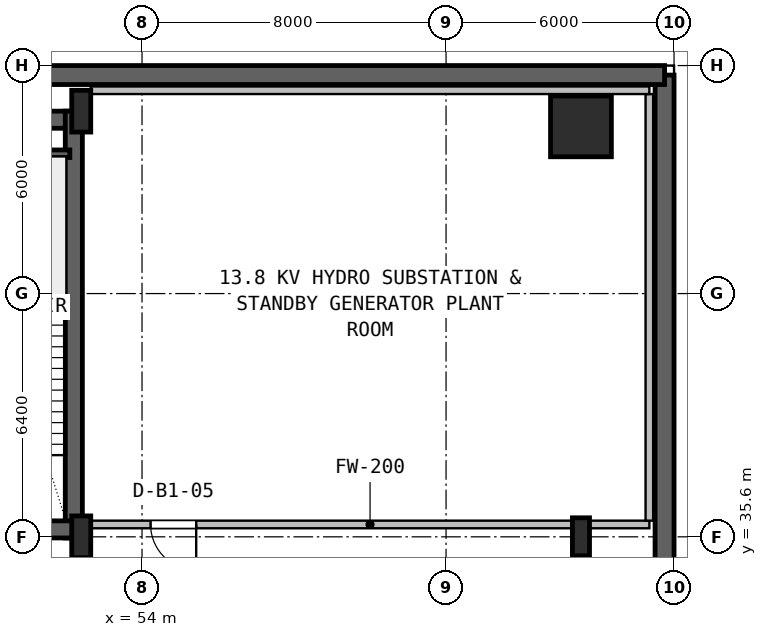
"""IFC4 building model, lengths in metres.
Left out: names, types, materials, properties, quantities, classifications, styles, units other than length and angle.
Written with IfcOpenShell. Run it as: python <this file> out.ifc"""

import sys

from ifc_helpers import new_model, si_unit, direction, frame, frame_2d, origin, origin_2d, place, context, subcontext, project, spatial, rectangle, hollow_rectangle, i_section, extrude, source, transform, mapped, element, fill, save


model = new_model("IFC4")
c1 = context("Model", 3, precision=1e-05, world=origin(), true_north=direction((0.0, 1.0)))
c2 = subcontext(c1, "Body", "Model", "MODEL_VIEW")
j1 = project(units=[si_unit("LENGTHUNIT", "METRE"), si_unit("PLANEANGLEUNIT", "RADIAN")], contexts=[c1])
p1 = place(None, origin())
s1 = spatial("IfcSite", under=j1, at=p1, CompositionType="ELEMENT")
p2 = place(p1, origin())
s2 = spatial("IfcBuilding", under=s1, at=p2, CompositionType="ELEMENT")
p3 = place(p2, frame((0.0, 0.0, -4.8)))
s3 = spatial("IfcBuildingStorey", under=s2, at=p3, CompositionType="ELEMENT", Elevation=-4.8)
p4 = place(p3, frame((67.75, 0.25, 0.0), z_axis=(0.0, 0.0, 1.0), x_axis=(0.0, 1.0, 0.0)))
e1 = element("IfcWall", 1, at=p4, inside=s3, PredefinedType="USERDEFINED", context=c2, shape_type="SweptSolid", body=[
    extrude(rectangle(XDim=47.5, YDim=0.5, at=frame_2d((23.75, 0.0))), origin(), (0.0, 0.0, 1.0), 4.48),
])
p5 = place(p3, frame((67.75, 47.75, 0.0), z_axis=(0.0, 0.0, 1.0), x_axis=(-1.0, 0.0, 0.0)))
e2 = element("IfcWall", 2, at=p5, inside=s3, PredefinedType="USERDEFINED", context=c2, shape_type="SweptSolid", body=[
    extrude(rectangle(XDim=67.5, YDim=0.5, at=frame_2d((33.75, 0.0))), origin(), (0.0, 0.0, 1.0), 4.48),
])
p6 = place(p3, frame((15.6, 46.575, 0.0), z_axis=(0.0, 0.0, 1.0), x_axis=(1.0, 0.0, 0.0)))
e3 = element("IfcWall", 3, at=p6, inside=s3, PredefinedType="SHEAR", context=c2, shape_type="SweptSolid", body=[
    extrude(rectangle(XDim=36.8, YDim=0.45, at=frame_2d((18.4, 0.0))), origin(), (0.0, 0.0, 1.0), 4.48),
])
p7 = place(p3, frame((52.205, 35.57, 0.0), z_axis=(0.0, 0.0, 1.0), x_axis=(0.0, 1.0, 0.0)))
e4 = element("IfcWall", 4, at=p7, inside=s3, PredefinedType="SHEAR", context=c2, shape_type="SweptSolid", body=[
    extrude(rectangle(XDim=11.23, YDim=0.45, at=frame_2d((5.615, 0.0))), origin(), (0.0, 0.0, 1.0), 4.48),
])
p8 = place(p3, frame((43.2, 35.795, 0.0), z_axis=(0.0, 0.0, 1.0), x_axis=(1.0, 0.0, 0.0)))
e5 = element("IfcWall", 5, at=p8, inside=s3, PredefinedType="SHEAR", context=c2, shape_type="SweptSolid", body=[
    extrude(rectangle(XDim=9.23, YDim=0.45, at=frame_2d((4.615, 0.0))), origin(), (0.0, 0.0, 1.0), 4.48),
])
p9 = place(p8, frame((6.25, 0.0, 0.0)))
e6 = element("IfcOpeningElement", 6, at=p9, cuts=e5, PredefinedType="OPENING", context=c2, shape_type="SweptSolid", body=[
    extrude(rectangle(XDim=0.95, YDim=2.1, at=frame_2d((0.475, 1.05))), frame((0.0, 0.235, 0.0), z_axis=(0.0, -1.0, 0.0), x_axis=(1.0, 0.0, 0.0)), (0.0, 0.0, 1.0), 0.47),
])
m1 = source(origin(), c2, "Body", "SweptSolid", [
    extrude(i_section(OverallWidth=0.5, OverallDepth=1.1, WebThickness=0.018, FlangeThickness=0.032, FilletRadius=0.018, at=origin_2d()), origin(), (0.0, 0.0, 1.0), 4.8),
])
for number, where, z_axis, x_axis in (
    (7, (52.4, 35.6, 0.0), (0.0, 0.0, 1.0), (1.0, 0.0, 0.0)),
    (8, (52.4, 46.8, 0.0), (0.0, 0.0, 1.0), (1.0, 0.0, 0.0)),
):
    element("IfcColumn", number, at=place(p3, frame(where, z_axis=z_axis, x_axis=x_axis)), inside=s3, PredefinedType="COLUMN", context=c2, shape_type="MappedRepresentation", body=[
        mapped(m1, transform((0.0, 0.0, 0.0), x_axis=(1.0, 0.0, 0.0), y_axis=(0.0, 1.0, 0.0), z_axis=(0.0, 0.0, 1.0), scale=1.0)),
    ])
m2 = source(origin(), c2, "Body", "SweptSolid", [
    extrude(hollow_rectangle(XDim=1.6, YDim=1.6, WallThickness=0.06, at=origin_2d()), origin(), (0.0, 0.0, 1.0), 4.8),
])
p10 = place(p3, frame((65.55, 46.4, 0.0), z_axis=(0.0, 0.0, 1.0), x_axis=(1.0, 0.0, 0.0)))
e9 = element("IfcColumn", 9, at=p10, inside=s3, PredefinedType="COLUMN", context=c2, shape_type="MappedRepresentation", body=[
    mapped(m2, transform((0.0, 0.0, 0.0), x_axis=(1.0, 0.0, 0.0), y_axis=(0.0, 1.0, 0.0), z_axis=(0.0, 0.0, 1.0), scale=1.0)),
])
m3 = source(origin(), c2, "Body", "SweptSolid", [
    extrude(i_section(OverallWidth=0.45, OverallDepth=1.0, WebThickness=0.016, FlangeThickness=0.03, FilletRadius=0.016, at=origin_2d()), origin(), (0.0, 0.0, 1.0), 4.8),
])
p11 = place(p3, frame((65.55, 35.6, 0.0), z_axis=(0.0, 0.0, 1.0), x_axis=(1.0, 0.0, 0.0)))
e10 = element("IfcColumn", 10, at=p11, inside=s3, PredefinedType="COLUMN", context=c2, shape_type="MappedRepresentation", body=[
    mapped(m3, transform((0.0, 0.0, 0.0), x_axis=(1.0, 0.0, 0.0), y_axis=(0.0, 1.0, 0.0), z_axis=(0.0, 0.0, 1.0), scale=1.0)),
])
p12 = place(p3, frame((48.92, 45.68, 0.0), z_axis=(0.0, 0.0, 1.0), x_axis=(1.0, 0.0, 0.0)))
e11 = element("IfcWall", 11, at=p12, inside=s3, PredefinedType="SHEAR", context=c2, shape_type="SweptSolid", body=[
    extrude(rectangle(XDim=3.18, YDim=0.2, at=frame_2d((1.59, 0.0))), origin(), (0.0, 0.0, 1.0), 4.48),
])
p13 = place(p3, frame((52.65, 35.925, 0.0), z_axis=(0.0, 0.0, 1.0), x_axis=(1.0, 0.0, 0.0)))
e12 = element("IfcWall", 12, at=p13, inside=s3, PredefinedType="SOLIDWALL", context=c2, shape_type="SweptSolid", body=[
    extrude(rectangle(XDim=14.7, YDim=0.2, at=frame_2d((7.35, 0.0))), origin(), (0.0, 0.0, 1.0), 3.275),
])
p14 = place(p13, frame((1.575, 0.0, 0.0)))
e13 = element("IfcOpeningElement", 13, at=p14, cuts=e12, PredefinedType="OPENING", context=c2, shape_type="SweptSolid", body=[
    extrude(rectangle(XDim=1.2, YDim=2.1, at=frame_2d((0.6, 1.05))), frame((0.0, 0.11, 0.0), z_axis=(0.0, -1.0, 0.0), x_axis=(1.0, 0.0, 0.0)), (0.0, 0.0, 1.0), 0.22),
])
p15 = place(p3, frame((67.35, 36.025, 0.0), z_axis=(0.0, 0.0, 1.0), x_axis=(0.0, 1.0, 0.0)))
e14 = element("IfcWall", 14, at=p15, inside=s3, PredefinedType="SOLIDWALL", context=c2, shape_type="SweptSolid", body=[
    extrude(rectangle(XDim=11.225, YDim=0.2, at=frame_2d((5.613, 0.0))), origin(), (0.0, 0.0, 1.0), 4.46),
])
p16 = place(p3, frame((52.65, 47.35, 0.0), z_axis=(0.0, 0.0, 1.0), x_axis=(1.0, 0.0, 0.0)))
e15 = element("IfcWall", 15, at=p16, inside=s3, PredefinedType="SOLIDWALL", context=c2, shape_type="SweptSolid", body=[
    extrude(rectangle(XDim=14.7, YDim=0.2, at=frame_2d((7.35, 0.0))), origin(), (0.0, 0.0, 1.0), 4.46),
])
m4 = source(origin(), c2, "Body", "SweptSolid", [
    extrude(rectangle(XDim=1.2, YDim=2.1, at=frame_2d((0.6, 1.05))), frame((0.0, 0.025, 0.0), z_axis=(0.0, -1.0, 0.0), x_axis=(1.0, 0.0, 0.0)), (0.0, 0.0, 1.0), 0.05),
])
p17 = place(p14, frame((1.2, 0.0, 0.0), z_axis=(0.0, 0.0, 1.0), x_axis=(-1.0, 0.0, 0.0)))
e16 = element("IfcDoor", 16, at=p17, inside=s3, OperationType="SINGLE_SWING_RIGHT", PredefinedType="DOOR", context=c2, shape_type="MappedRepresentation", body=[
    mapped(m4, transform((0.0, 0.0, 0.0), x_axis=(1.0, 0.0, 0.0), y_axis=(0.0, 1.0, 0.0), z_axis=(0.0, 0.0, 1.0), scale=1.0)),
])
fill(e13, e16)
save(model, sys.argv[1])
